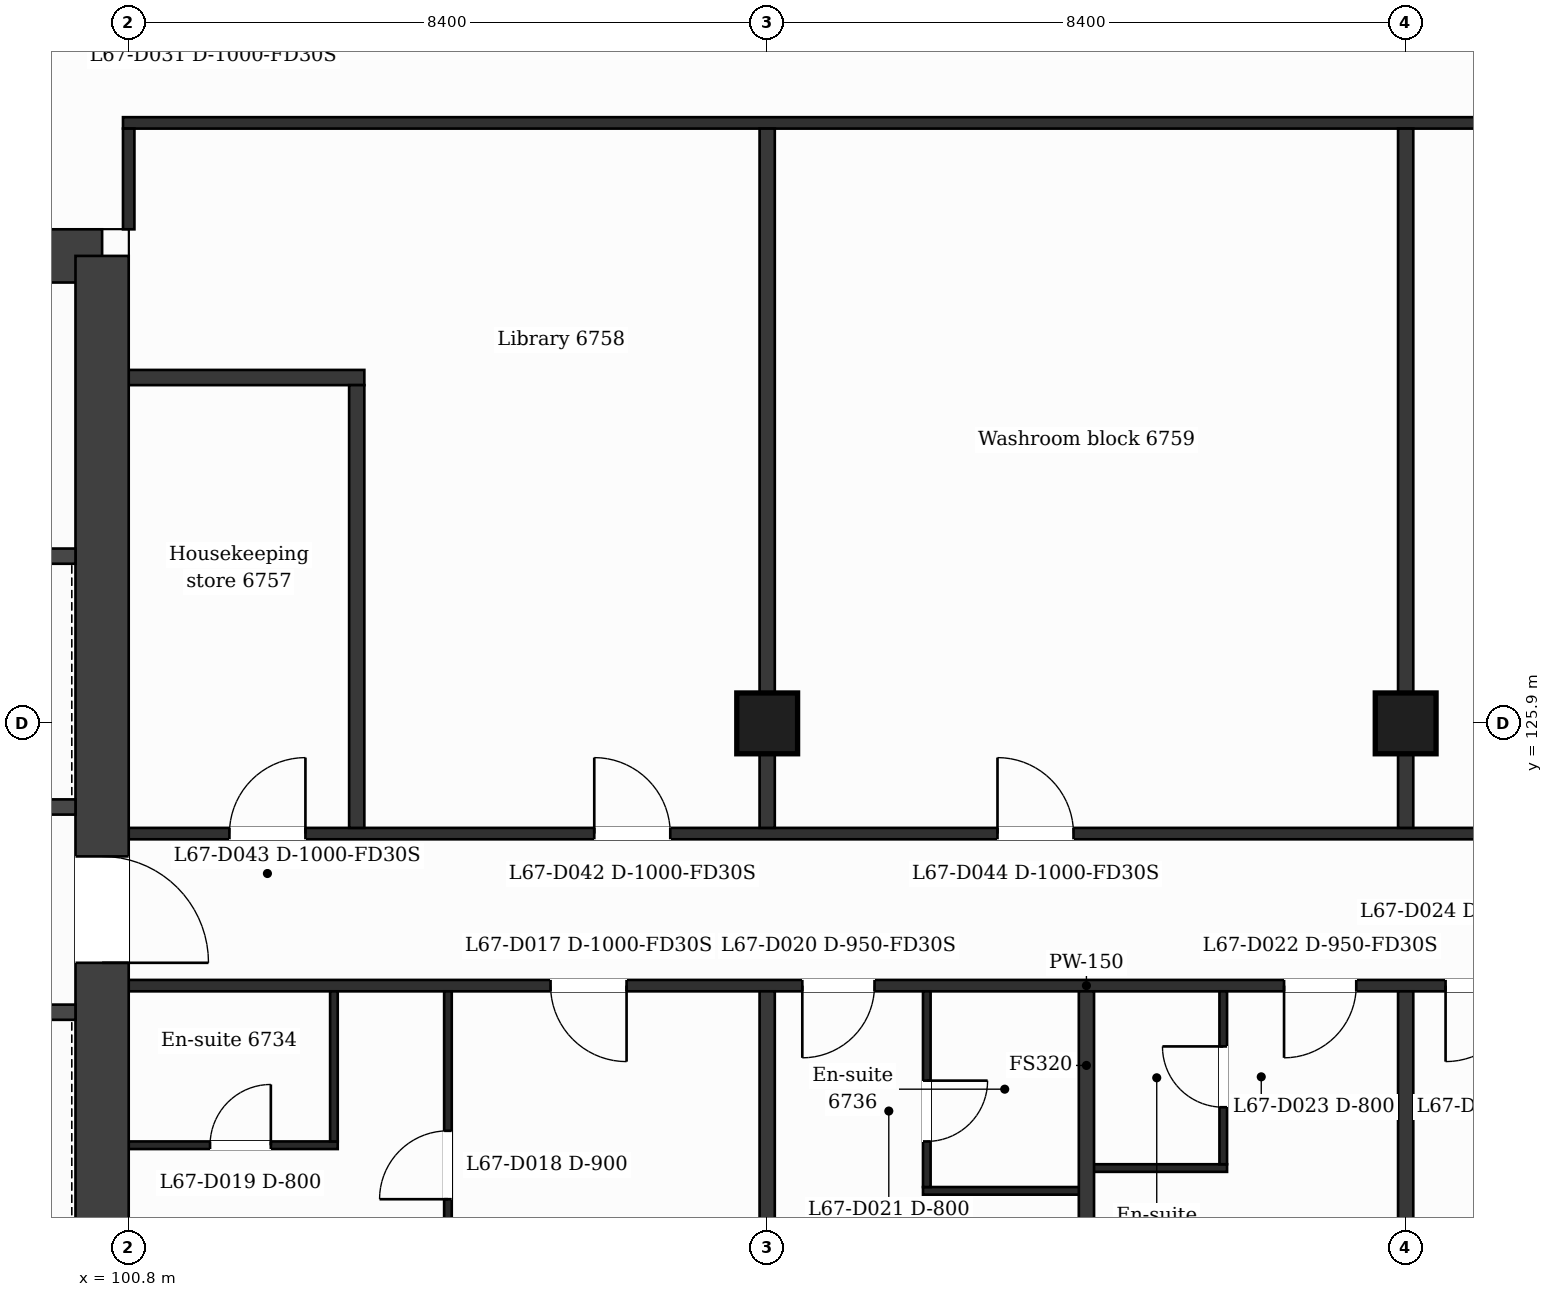
"""IFC4 building model, lengths in metres.
Left out: names, types, materials, properties, quantities, classifications, styles, units other than length and angle.
Written with IfcOpenShell. Run it as: python <this file> out.ifc"""

import sys

from ifc_helpers import new_model, si_unit, direction, frame, frame_2d, origin, origin_2d, place, context, subcontext, project, spatial, rectangle, extrude, element, fill, save


model = new_model("IFC4")
c1 = context("Model", 3, precision=1e-05, world=origin(), true_north=direction((0.0, 1.0)))
c2 = subcontext(c1, "Body", "Model", "MODEL_VIEW")
j1 = project(units=[si_unit("LENGTHUNIT", "METRE"), si_unit("PLANEANGLEUNIT", "RADIAN")], contexts=[c1])
p1 = place(None, origin())
s1 = spatial("IfcSite", under=j1, at=p1, CompositionType="ELEMENT")
p2 = place(p1, origin())
s2 = spatial("IfcBuilding", under=s1, at=p2, CompositionType="ELEMENT")
p3 = place(p2, frame((0.0, 0.0, 277.5)))
s3 = spatial("IfcBuildingStorey", under=s2, at=p3, CompositionType="ELEMENT", Elevation=277.5)
p4 = place(p3, frame((88.937, 132.05, 0.0), z_axis=(0.0, 0.0, 1.0), x_axis=(1.0, 0.0, 0.0)))
e1 = element("IfcWall", 1, at=p4, inside=s3, PredefinedType="SHEAR", context=c2, shape_type="SweptSolid", body=[
    extrude(rectangle(XDim=11.513, YDim=0.7, at=frame_2d((5.757, 0.0))), origin(), (0.0, 0.0, 1.0), 3.7),
])
p5 = place(p4, frame((6.927, 0.0, 0.0)))
e2 = element("IfcOpeningElement", 2, at=p5, cuts=e1, PredefinedType="OPENING", context=c2, shape_type="SweptSolid", body=[
    extrude(rectangle(XDim=1.2, YDim=2.1, at=frame_2d((0.6, 1.05))), frame((0.0, 0.36, 0.0), z_axis=(0.0, -1.0, 0.0), x_axis=(1.0, 0.0, 0.0)), (0.0, 0.0, 1.0), 0.72),
])
p6 = place(p3, frame((100.45, 132.05, 0.0), z_axis=(0.0, 0.0, 1.0), x_axis=(0.0, -1.0, 0.0)))
e3 = element("IfcWall", 3, at=p6, inside=s3, PredefinedType="SHEAR", context=c2, shape_type="SweptSolid", body=[
    extrude(rectangle(XDim=21.3, YDim=0.7, at=frame_2d((10.65, 0.0))), origin(), (0.0, 0.0, 1.0), 3.7),
])
p7 = place(p6, frame((7.9, 0.0, 0.0)))
e4 = element("IfcOpeningElement", 4, at=p7, cuts=e3, PredefinedType="OPENING", context=c2, shape_type="SweptSolid", body=[
    extrude(rectangle(XDim=1.4, YDim=2.1, at=frame_2d((0.7, 1.05))), frame((0.0, 0.36, 0.0), z_axis=(0.0, -1.0, 0.0), x_axis=(1.0, 0.0, 0.0)), (0.0, 0.0, 1.0), 0.72),
])
for number, where, z_axis, x_axis in (
    (5, (109.2, 125.9, 0.0), (0.0, 0.0, 1.0), (1.0, 0.0, 0.0)),
    (6, (117.6, 125.9, 0.0), (0.0, 0.0, 1.0), (1.0, 0.0, 0.0)),
):
    element("IfcColumn", number, at=place(p3, frame(where, z_axis=z_axis, x_axis=x_axis)), inside=s3, PredefinedType="COLUMN", context=c2, shape_type="SweptSolid", body=[
        extrude(rectangle(XDim=0.8, YDim=0.8, at=origin_2d()), origin(), (0.0, 0.0, 1.0), 3.7),
    ])
p8 = place(p3, frame((111.25, 119.75, 0.0), z_axis=(0.0, 0.0, 1.0), x_axis=(1.0, 0.0, 0.0)))
e7 = element("IfcWall", 7, at=p8, inside=s3, PredefinedType="PARTITIONING", context=c2, shape_type="SweptSolid", body=[
    extrude(rectangle(XDim=2.15, YDim=0.1, at=frame_2d((1.075, 0.0))), origin(), (0.0, 0.0, 1.0), 3.38),
])
p9 = place(p3, frame((113.4, 120.05, 0.0), z_axis=(0.0, 0.0, 1.0), x_axis=(1.0, 0.0, 0.0)))
e8 = element("IfcWall", 8, at=p9, inside=s3, PredefinedType="PARTITIONING", context=c2, shape_type="SweptSolid", body=[
    extrude(rectangle(XDim=1.85, YDim=0.1, at=frame_2d((0.925, 0.0))), origin(), (0.0, 0.0, 1.0), 3.38),
])
p10 = place(p3, frame((100.8, 120.35, 0.0), z_axis=(0.0, 0.0, 1.0), x_axis=(1.0, 0.0, 0.0)))
e9 = element("IfcWall", 9, at=p10, inside=s3, PredefinedType="PARTITIONING", context=c2, shape_type="SweptSolid", body=[
    extrude(rectangle(XDim=2.75, YDim=0.1, at=frame_2d((1.375, 0.0))), origin(), (0.0, 0.0, 1.0), 3.38),
])
p11 = place(p10, frame((1.07, 0.0, 0.0)))
e10 = element("IfcOpeningElement", 10, at=p11, cuts=e9, PredefinedType="OPENING", context=c2, shape_type="SweptSolid", body=[
    extrude(rectangle(XDim=0.8, YDim=2.1, at=frame_2d((0.4, 1.05))), frame((0.0, 0.06, 0.0), z_axis=(0.0, -1.0, 0.0), x_axis=(1.0, 0.0, 0.0)), (0.0, 0.0, 1.0), 0.12),
])
p12 = place(p3, frame((95.227, 122.1, 0.0), z_axis=(0.0, 0.0, 1.0), x_axis=(1.0, 0.0, 0.0)))
e11 = element("IfcWall", 11, at=p12, inside=s3, PredefinedType="PARTITIONING", context=c2, shape_type="SweptSolid", body=[
    extrude(rectangle(XDim=4.873, YDim=0.2, at=frame_2d((2.437, 0.0))), origin(), (0.0, 0.0, 1.0), 3.38),
])
p13 = place(p12, frame((0.605, 0.0, 0.0)))
e12 = element("IfcOpeningElement", 12, at=p13, cuts=e11, PredefinedType="OPENING", context=c2, shape_type="SweptSolid", body=[
    extrude(rectangle(XDim=1.1, YDim=2.1, at=frame_2d((0.55, 1.05))), frame((0.0, 0.11, 0.0), z_axis=(0.0, -1.0, 0.0), x_axis=(1.0, 0.0, 0.0)), (0.0, 0.0, 1.0), 0.22),
])
p14 = place(p12, frame((2.946, 0.0, 0.0)))
e13 = element("IfcOpeningElement", 13, at=p14, cuts=e11, PredefinedType="OPENING", context=c2, shape_type="SweptSolid", body=[
    extrude(rectangle(XDim=1.1, YDim=2.1, at=frame_2d((0.55, 1.05))), frame((0.0, 0.11, 0.0), z_axis=(0.0, -1.0, 0.0), x_axis=(1.0, 0.0, 0.0)), (0.0, 0.0, 1.0), 0.22),
])
p15 = place(p3, frame((100.8, 122.45, 0.0), z_axis=(0.0, 0.0, 1.0), x_axis=(1.0, 0.0, 0.0)))
e14 = element("IfcWall", 14, at=p15, inside=s3, PredefinedType="PARTITIONING", context=c2, shape_type="SweptSolid", body=[
    extrude(rectangle(XDim=25.2, YDim=0.15, at=frame_2d((12.6, 0.0))), origin(), (0.0, 0.0, 1.0), 3.38),
])
p16 = place(p15, frame((5.55, 0.0, 0.0)))
e15 = element("IfcOpeningElement", 15, at=p16, cuts=e14, PredefinedType="OPENING", context=c2, shape_type="SweptSolid", body=[
    extrude(rectangle(XDim=1.0, YDim=2.1, at=frame_2d((0.5, 1.05))), frame((0.0, 0.085, 0.0), z_axis=(0.0, -1.0, 0.0), x_axis=(1.0, 0.0, 0.0)), (0.0, 0.0, 1.0), 0.17),
])
p17 = place(p15, frame((8.862, 0.0, 0.0)))
e16 = element("IfcOpeningElement", 16, at=p17, cuts=e14, PredefinedType="OPENING", context=c2, shape_type="SweptSolid", body=[
    extrude(rectangle(XDim=0.95, YDim=2.1, at=frame_2d((0.475, 1.05))), frame((0.0, 0.085, 0.0), z_axis=(0.0, -1.0, 0.0), x_axis=(1.0, 0.0, 0.0)), (0.0, 0.0, 1.0), 0.17),
])
p18 = place(p15, frame((15.2, 0.0, 0.0)))
e17 = element("IfcOpeningElement", 17, at=p18, cuts=e14, PredefinedType="OPENING", context=c2, shape_type="SweptSolid", body=[
    extrude(rectangle(XDim=0.95, YDim=2.1, at=frame_2d((0.475, 1.05))), frame((0.0, 0.085, 0.0), z_axis=(0.0, -1.0, 0.0), x_axis=(1.0, 0.0, 0.0)), (0.0, 0.0, 1.0), 0.17),
])
p19 = place(p15, frame((17.325, 0.0, 0.0)))
e18 = element("IfcOpeningElement", 18, at=p19, cuts=e14, PredefinedType="OPENING", context=c2, shape_type="SweptSolid", body=[
    extrude(rectangle(XDim=1.0, YDim=2.1, at=frame_2d((0.5, 1.05))), frame((0.0, 0.085, 0.0), z_axis=(0.0, -1.0, 0.0), x_axis=(1.0, 0.0, 0.0)), (0.0, 0.0, 1.0), 0.17),
])
p20 = place(p15, frame((23.862, 0.0, 0.0)))
e19 = element("IfcOpeningElement", 19, at=p20, cuts=e14, PredefinedType="OPENING", context=c2, shape_type="SweptSolid", body=[
    extrude(rectangle(XDim=0.95, YDim=2.1, at=frame_2d((0.475, 1.05))), frame((0.0, 0.085, 0.0), z_axis=(0.0, -1.0, 0.0), x_axis=(1.0, 0.0, 0.0)), (0.0, 0.0, 1.0), 0.17),
])
p21 = place(p3, frame((100.8, 124.45, 0.0), z_axis=(0.0, 0.0, 1.0), x_axis=(1.0, 0.0, 0.0)))
e20 = element("IfcWall", 20, at=p21, inside=s3, PredefinedType="PARTITIONING", context=c2, shape_type="SweptSolid", body=[
    extrude(rectangle(XDim=25.2, YDim=0.15, at=frame_2d((12.6, 0.0))), origin(), (0.0, 0.0, 1.0), 3.38),
])
p22 = place(p21, frame((6.125, 0.0, 0.0)))
e21 = element("IfcOpeningElement", 21, at=p22, cuts=e20, PredefinedType="OPENING", context=c2, shape_type="SweptSolid", body=[
    extrude(rectangle(XDim=1.0, YDim=2.1, at=frame_2d((0.5, 1.05))), frame((0.0, 0.085, 0.0), z_axis=(0.0, -1.0, 0.0), x_axis=(1.0, 0.0, 0.0)), (0.0, 0.0, 1.0), 0.17),
])
p23 = place(p21, frame((1.325, 0.0, 0.0)))
e22 = element("IfcOpeningElement", 22, at=p23, cuts=e20, PredefinedType="OPENING", context=c2, shape_type="SweptSolid", body=[
    extrude(rectangle(XDim=1.0, YDim=2.1, at=frame_2d((0.5, 1.05))), frame((0.0, 0.085, 0.0), z_axis=(0.0, -1.0, 0.0), x_axis=(1.0, 0.0, 0.0)), (0.0, 0.0, 1.0), 0.17),
])
p24 = place(p21, frame((11.43, 0.0, 0.0)))
e23 = element("IfcOpeningElement", 23, at=p24, cuts=e20, PredefinedType="OPENING", context=c2, shape_type="SweptSolid", body=[
    extrude(rectangle(XDim=1.0, YDim=2.1, at=frame_2d((0.5, 1.05))), frame((0.0, 0.085, 0.0), z_axis=(0.0, -1.0, 0.0), x_axis=(1.0, 0.0, 0.0)), (0.0, 0.0, 1.0), 0.17),
])
p25 = place(p21, frame((21.17, 0.0, 0.0)))
e24 = element("IfcOpeningElement", 24, at=p25, cuts=e20, PredefinedType="OPENING", context=c2, shape_type="SweptSolid", body=[
    extrude(rectangle(XDim=1.0, YDim=2.1, at=frame_2d((0.5, 1.05))), frame((0.0, 0.085, 0.0), z_axis=(0.0, -1.0, 0.0), x_axis=(1.0, 0.0, 0.0)), (0.0, 0.0, 1.0), 0.17),
])
p26 = place(p3, frame((92.702, 124.8, 0.0), z_axis=(0.0, 0.0, 1.0), x_axis=(1.0, 0.0, 0.0)))
e25 = element("IfcWall", 25, at=p26, inside=s3, PredefinedType="PARTITIONING", context=c2, shape_type="SweptSolid", body=[
    extrude(rectangle(XDim=7.398, YDim=0.2, at=frame_2d((3.699, 0.0))), origin(), (0.0, 0.0, 1.0), 3.38),
])
p27 = place(p26, frame((5.636, 0.0, 0.0)))
e26 = element("IfcOpeningElement", 26, at=p27, cuts=e25, PredefinedType="OPENING", context=c2, shape_type="SweptSolid", body=[
    extrude(rectangle(XDim=1.1, YDim=2.1, at=frame_2d((0.55, 1.05))), frame((0.0, 0.11, 0.0), z_axis=(0.0, -1.0, 0.0), x_axis=(1.0, 0.0, 0.0)), (0.0, 0.0, 1.0), 0.22),
])
p28 = place(p3, frame((92.827, 128.1, 0.0), z_axis=(0.0, 0.0, 1.0), x_axis=(1.0, 0.0, 0.0)))
e27 = element("IfcWall", 27, at=p28, inside=s3, PredefinedType="PARTITIONING", context=c2, shape_type="SweptSolid", body=[
    extrude(rectangle(XDim=7.273, YDim=0.2, at=frame_2d((3.637, 0.0))), origin(), (0.0, 0.0, 1.0), 3.38),
])
p29 = place(p28, frame((2.93, 0.0, 0.0)))
e28 = element("IfcOpeningElement", 28, at=p29, cuts=e27, PredefinedType="OPENING", context=c2, shape_type="SweptSolid", body=[
    extrude(rectangle(XDim=1.1, YDim=2.1, at=frame_2d((0.55, 1.05))), frame((0.0, 0.11, 0.0), z_axis=(0.0, -1.0, 0.0), x_axis=(1.0, 0.0, 0.0)), (0.0, 0.0, 1.0), 0.22),
])
p30 = place(p3, frame((100.8, 130.45, 0.0), z_axis=(0.0, 0.0, 1.0), x_axis=(1.0, 0.0, 0.0)))
e29 = element("IfcWall", 29, at=p30, inside=s3, PredefinedType="PARTITIONING", context=c2, shape_type="SweptSolid", body=[
    extrude(rectangle(XDim=3.1, YDim=0.2, at=frame_2d((1.55, 0.0))), origin(), (0.0, 0.0, 1.0), 3.38),
])
p31 = place(p3, frame((100.725, 133.8, 0.0), z_axis=(0.0, 0.0, 1.0), x_axis=(1.0, 0.0, 0.0)))
e30 = element("IfcWall", 30, at=p31, inside=s3, PredefinedType="PARTITIONING", context=c2, shape_type="SweptSolid", body=[
    extrude(rectangle(XDim=25.35, YDim=0.15, at=frame_2d((12.675, 0.0))), origin(), (0.0, 0.0, 1.0), 3.38),
])
p32 = place(p3, frame((100.8, 132.4, 0.0), z_axis=(0.0, 0.0, 1.0), x_axis=(0.0, 1.0, 0.0)))
e31 = element("IfcWall", 31, at=p32, inside=s3, PredefinedType="PARTITIONING", context=c2, shape_type="SweptSolid", body=[
    extrude(rectangle(XDim=1.325, YDim=0.15, at=frame_2d((0.663, 0.0))), origin(), (0.0, 0.0, 1.0), 3.38),
])
p33 = place(p3, frame((103.5, 120.4, 0.0), z_axis=(0.0, 0.0, 1.0), x_axis=(0.0, 1.0, 0.0)))
e32 = element("IfcWall", 32, at=p33, inside=s3, PredefinedType="PARTITIONING", context=c2, shape_type="SweptSolid", body=[
    extrude(rectangle(XDim=1.975, YDim=0.1, at=frame_2d((0.988, 0.0))), origin(), (0.0, 0.0, 1.0), 3.38),
])
p34 = place(p3, frame((103.8, 124.525, 0.0), z_axis=(0.0, 0.0, 1.0), x_axis=(0.0, 1.0, 0.0)))
e33 = element("IfcWall", 33, at=p34, inside=s3, PredefinedType="PARTITIONING", context=c2, shape_type="SweptSolid", body=[
    extrude(rectangle(XDim=5.825, YDim=0.2, at=frame_2d((2.913, 0.0))), origin(), (0.0, 0.0, 1.0), 3.38),
])
p35 = place(p3, frame((105.0, 110.55, 0.0), z_axis=(0.0, 0.0, 1.0), x_axis=(0.0, 1.0, 0.0)))
e34 = element("IfcWall", 34, at=p35, inside=s3, PredefinedType="PARTITIONING", context=c2, shape_type="SweptSolid", body=[
    extrude(rectangle(XDim=11.825, YDim=0.1, at=frame_2d((5.913, 0.0))), origin(), (0.0, 0.0, 1.0), 3.38),
])
p36 = place(p35, frame((9.09, 0.0, 0.0)))
e35 = element("IfcOpeningElement", 35, at=p36, cuts=e34, PredefinedType="OPENING", context=c2, shape_type="SweptSolid", body=[
    extrude(rectangle(XDim=0.9, YDim=2.1, at=frame_2d((0.45, 1.05))), frame((0.0, 0.06, 0.0), z_axis=(0.0, -1.0, 0.0), x_axis=(1.0, 0.0, 0.0)), (0.0, 0.0, 1.0), 0.12),
])
p37 = place(p3, frame((109.2, 110.55, 0.0), z_axis=(0.0, 0.0, 1.0), x_axis=(0.0, 1.0, 0.0)))
e36 = element("IfcWall", 36, at=p37, inside=s3, PredefinedType="PARTITIONING", context=c2, shape_type="SweptSolid", body=[
    extrude(rectangle(XDim=11.825, YDim=0.2, at=frame_2d((5.913, 0.0))), origin(), (0.0, 0.0, 1.0), 3.38),
])
p38 = place(p3, frame((109.2, 124.525, 0.0), z_axis=(0.0, 0.0, 1.0), x_axis=(0.0, 1.0, 0.0)))
e37 = element("IfcWall", 37, at=p38, inside=s3, PredefinedType="PARTITIONING", context=c2, shape_type="SweptSolid", body=[
    extrude(rectangle(XDim=9.2, YDim=0.2, at=frame_2d((4.6, 0.0))), origin(), (0.0, 0.0, 1.0), 3.38),
])
p39 = place(p3, frame((111.3, 119.8, 0.0), z_axis=(0.0, 0.0, 1.0), x_axis=(0.0, 1.0, 0.0)))
e38 = element("IfcWall", 38, at=p39, inside=s3, PredefinedType="PARTITIONING", context=c2, shape_type="SweptSolid", body=[
    extrude(rectangle(XDim=2.575, YDim=0.1, at=frame_2d((1.288, 0.0))), origin(), (0.0, 0.0, 1.0), 3.38),
])
p40 = place(p39, frame((0.6, 0.0, 0.0)))
e39 = element("IfcOpeningElement", 39, at=p40, cuts=e38, PredefinedType="OPENING", context=c2, shape_type="SweptSolid", body=[
    extrude(rectangle(XDim=0.8, YDim=2.1, at=frame_2d((0.4, 1.05))), frame((0.0, 0.06, 0.0), z_axis=(0.0, -1.0, 0.0), x_axis=(1.0, 0.0, 0.0)), (0.0, 0.0, 1.0), 0.12),
])
p41 = place(p3, frame((113.4, 110.55, 0.0), z_axis=(0.0, 0.0, 1.0), x_axis=(0.0, 1.0, 0.0)))
e40 = element("IfcWall", 40, at=p41, inside=s3, PredefinedType="PARTITIONING", context=c2, shape_type="SweptSolid", body=[
    extrude(rectangle(XDim=11.825, YDim=0.2, at=frame_2d((5.913, 0.0))), origin(), (0.0, 0.0, 1.0), 3.38),
])
p42 = place(p3, frame((115.2, 120.1, 0.0), z_axis=(0.0, 0.0, 1.0), x_axis=(0.0, 1.0, 0.0)))
e41 = element("IfcWall", 41, at=p42, inside=s3, PredefinedType="PARTITIONING", context=c2, shape_type="SweptSolid", body=[
    extrude(rectangle(XDim=2.275, YDim=0.1, at=frame_2d((1.137, 0.0))), origin(), (0.0, 0.0, 1.0), 3.38),
])
p43 = place(p42, frame((0.75, 0.0, 0.0)))
e42 = element("IfcOpeningElement", 42, at=p43, cuts=e41, PredefinedType="OPENING", context=c2, shape_type="SweptSolid", body=[
    extrude(rectangle(XDim=0.8, YDim=2.1, at=frame_2d((0.4, 1.05))), frame((0.0, 0.06, 0.0), z_axis=(0.0, -1.0, 0.0), x_axis=(1.0, 0.0, 0.0)), (0.0, 0.0, 1.0), 0.12),
])
p44 = place(p3, frame((117.6, 110.55, 0.0), z_axis=(0.0, 0.0, 1.0), x_axis=(0.0, 1.0, 0.0)))
e43 = element("IfcWall", 43, at=p44, inside=s3, PredefinedType="PARTITIONING", context=c2, shape_type="SweptSolid", body=[
    extrude(rectangle(XDim=11.825, YDim=0.2, at=frame_2d((5.913, 0.0))), origin(), (0.0, 0.0, 1.0), 3.38),
])
p45 = place(p3, frame((117.6, 124.525, 0.0), z_axis=(0.0, 0.0, 1.0), x_axis=(0.0, 1.0, 0.0)))
e44 = element("IfcWall", 44, at=p45, inside=s3, PredefinedType="PARTITIONING", context=c2, shape_type="SweptSolid", body=[
    extrude(rectangle(XDim=9.2, YDim=0.2, at=frame_2d((4.6, 0.0))), origin(), (0.0, 0.0, 1.0), 3.38),
])
p46 = place(p16, origin())
e45 = element("IfcDoor", 45, at=p46, inside=s3, OperationType="SINGLE_SWING_RIGHT", PredefinedType="DOOR", context=c2, shape_type="SweptSolid", body=[
    extrude(rectangle(XDim=1.0, YDim=2.1, at=frame_2d((0.5, 1.05))), frame((0.0, 0.025, 0.0), z_axis=(0.0, -1.0, 0.0), x_axis=(1.0, 0.0, 0.0)), (0.0, 0.0, 1.0), 0.05),
])
fill(e15, e45)
p47 = place(p36, origin())
e46 = element("IfcDoor", 46, at=p47, inside=s3, OperationType="SINGLE_SWING_LEFT", PredefinedType="DOOR", context=c2, shape_type="SweptSolid", body=[
    extrude(rectangle(XDim=0.9, YDim=2.1, at=frame_2d((0.45, 1.05))), frame((0.0, 0.025, 0.0), z_axis=(0.0, -1.0, 0.0), x_axis=(1.0, 0.0, 0.0)), (0.0, 0.0, 1.0), 0.05),
])
fill(e35, e46)
p48 = place(p11, origin())
e47 = element("IfcDoor", 47, at=p48, inside=s3, OperationType="SINGLE_SWING_RIGHT", PredefinedType="DOOR", context=c2, shape_type="SweptSolid", body=[
    extrude(rectangle(XDim=0.8, YDim=2.1, at=frame_2d((0.4, 1.05))), frame((0.0, 0.025, 0.0), z_axis=(0.0, -1.0, 0.0), x_axis=(1.0, 0.0, 0.0)), (0.0, 0.0, 1.0), 0.05),
])
fill(e10, e47)
p49 = place(p17, origin())
e48 = element("IfcDoor", 48, at=p49, inside=s3, OperationType="SINGLE_SWING_LEFT", PredefinedType="DOOR", context=c2, shape_type="SweptSolid", body=[
    extrude(rectangle(XDim=0.95, YDim=2.1, at=frame_2d((0.475, 1.05))), frame((0.0, 0.025, 0.0), z_axis=(0.0, -1.0, 0.0), x_axis=(1.0, 0.0, 0.0)), (0.0, 0.0, 1.0), 0.05),
])
fill(e16, e48)
p50 = place(p40, origin())
e49 = element("IfcDoor", 49, at=p50, inside=s3, OperationType="SINGLE_SWING_RIGHT", PredefinedType="DOOR", context=c2, shape_type="SweptSolid", body=[
    extrude(rectangle(XDim=0.8, YDim=2.1, at=frame_2d((0.4, 1.05))), frame((0.0, 0.025, 0.0), z_axis=(0.0, -1.0, 0.0), x_axis=(1.0, 0.0, 0.0)), (0.0, 0.0, 1.0), 0.05),
])
fill(e39, e49)
p51 = place(p18, origin())
e50 = element("IfcDoor", 50, at=p51, inside=s3, OperationType="SINGLE_SWING_LEFT", PredefinedType="DOOR", context=c2, shape_type="SweptSolid", body=[
    extrude(rectangle(XDim=0.95, YDim=2.1, at=frame_2d((0.475, 1.05))), frame((0.0, 0.025, 0.0), z_axis=(0.0, -1.0, 0.0), x_axis=(1.0, 0.0, 0.0)), (0.0, 0.0, 1.0), 0.05),
])
fill(e17, e50)
p52 = place(p43, origin())
e51 = element("IfcDoor", 51, at=p52, inside=s3, OperationType="SINGLE_SWING_RIGHT", PredefinedType="DOOR", context=c2, shape_type="SweptSolid", body=[
    extrude(rectangle(XDim=0.8, YDim=2.1, at=frame_2d((0.4, 1.05))), frame((0.0, 0.025, 0.0), z_axis=(0.0, -1.0, 0.0), x_axis=(1.0, 0.0, 0.0)), (0.0, 0.0, 1.0), 0.05),
])
fill(e42, e51)
p53 = place(p19, origin())
e52 = element("IfcDoor", 52, at=p53, inside=s3, OperationType="SINGLE_SWING_LEFT", PredefinedType="DOOR", context=c2, shape_type="SweptSolid", body=[
    extrude(rectangle(XDim=1.0, YDim=2.1, at=frame_2d((0.5, 1.05))), frame((0.0, 0.025, 0.0), z_axis=(0.0, -1.0, 0.0), x_axis=(1.0, 0.0, 0.0)), (0.0, 0.0, 1.0), 0.05),
])
fill(e18, e52)
p54 = place(p22, origin())
e53 = element("IfcDoor", 53, at=p54, inside=s3, OperationType="SINGLE_SWING_LEFT", PredefinedType="DOOR", context=c2, shape_type="SweptSolid", body=[
    extrude(rectangle(XDim=1.0, YDim=2.1, at=frame_2d((0.5, 1.05))), frame((0.0, 0.025, 0.0), z_axis=(0.0, -1.0, 0.0), x_axis=(1.0, 0.0, 0.0)), (0.0, 0.0, 1.0), 0.05),
])
fill(e21, e53)
p55 = place(p23, origin())
e54 = element("IfcDoor", 54, at=p55, inside=s3, OperationType="SINGLE_SWING_RIGHT", PredefinedType="DOOR", context=c2, shape_type="SweptSolid", body=[
    extrude(rectangle(XDim=1.0, YDim=2.1, at=frame_2d((0.5, 1.05))), frame((0.0, 0.025, 0.0), z_axis=(0.0, -1.0, 0.0), x_axis=(1.0, 0.0, 0.0)), (0.0, 0.0, 1.0), 0.05),
])
fill(e22, e54)
p56 = place(p24, origin())
e55 = element("IfcDoor", 55, at=p56, inside=s3, OperationType="SINGLE_SWING_LEFT", PredefinedType="DOOR", context=c2, shape_type="SweptSolid", body=[
    extrude(rectangle(XDim=1.0, YDim=2.1, at=frame_2d((0.5, 1.05))), frame((0.0, 0.025, 0.0), z_axis=(0.0, -1.0, 0.0), x_axis=(1.0, 0.0, 0.0)), (0.0, 0.0, 1.0), 0.05),
])
fill(e23, e55)
p57 = place(p7, origin())
e56 = element("IfcDoor", 56, at=p57, inside=s3, OperationType="SINGLE_SWING_RIGHT", PredefinedType="DOOR", context=c2, shape_type="SweptSolid", body=[
    extrude(rectangle(XDim=1.4, YDim=2.1, at=frame_2d((0.7, 1.05))), frame((0.0, 0.025, 0.0), z_axis=(0.0, -1.0, 0.0), x_axis=(1.0, 0.0, 0.0)), (0.0, 0.0, 1.0), 0.05),
])
fill(e4, e56)
save(model, sys.argv[1])
